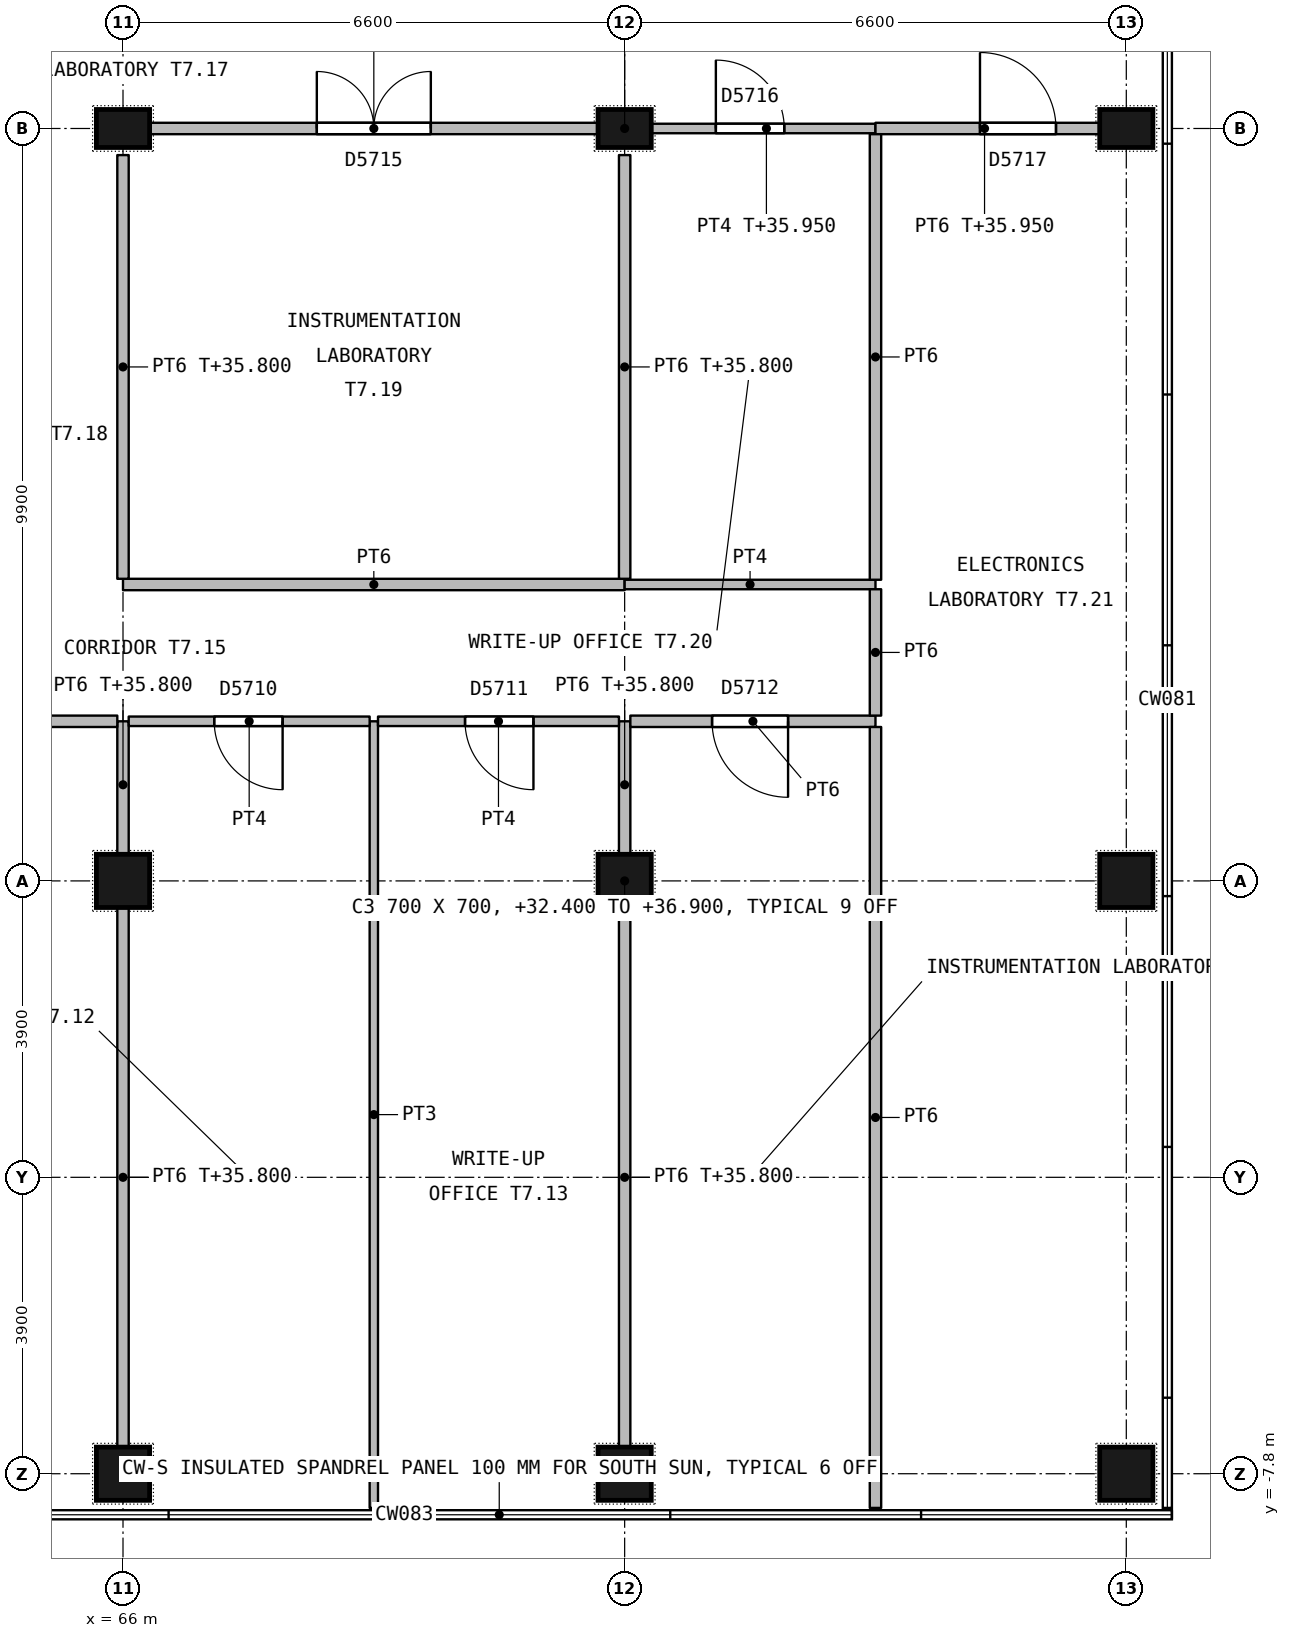
"""IFC4 building model, lengths in metres.
Left out: names, types, materials, properties, quantities, classifications, styles, units other than length and angle.
Written with IfcOpenShell. Run it as: python <this file> out.ifc"""

import sys

from ifc_helpers import new_model, si_unit, direction, frame, frame_2d, origin, origin_2d, place, context, subcontext, project, spatial, rectangle, extrude, element, fill, save


model = new_model("IFC4")
c1 = context("Model", 3, precision=1e-05, world=origin(), true_north=direction((0.0, 1.0)))
c2 = subcontext(c1, "Body", "Model", "MODEL_VIEW")
j1 = project(units=[si_unit("LENGTHUNIT", "METRE"), si_unit("PLANEANGLEUNIT", "RADIAN")], contexts=[c1])
p1 = place(None, origin())
s1 = spatial("IfcSite", under=j1, at=p1, CompositionType="ELEMENT")
p2 = place(p1, origin())
s2 = spatial("IfcBuilding", under=s1, at=p2, CompositionType="ELEMENT")
p3 = place(p2, frame((0.0, 0.0, 32.4)))
s3 = spatial("IfcBuildingStorey", under=s2, at=p3, CompositionType="ELEMENT", Elevation=32.4)
for number, where, z_axis, x_axis in (
    (1, (66.0, -7.8, 0.0), (0.0, 0.0, 1.0), (1.0, 0.0, 0.0)),
    (2, (66.0, 0.0, 0.0), (0.0, 0.0, 1.0), (1.0, 0.0, 0.0)),
):
    element("IfcColumn", number, at=place(p3, frame(where, z_axis=z_axis, x_axis=x_axis)), inside=s3, PredefinedType="COLUMN", context=c2, shape_type="SweptSolid", body=[
        extrude(rectangle(XDim=0.7, YDim=0.7, at=origin_2d()), origin(), (0.0, 0.0, 1.0), 4.5),
    ])
p4 = place(p3, frame((66.0, 9.9, 0.0), z_axis=(0.0, 0.0, 1.0), x_axis=(1.0, 0.0, 0.0)))
e3 = element("IfcColumn", 3, at=p4, inside=s3, PredefinedType="COLUMN", context=c2, shape_type="SweptSolid", body=[
    extrude(rectangle(XDim=0.7, YDim=0.5, at=origin_2d()), origin(), (0.0, 0.0, 1.0), 4.5),
])
for number, where, z_axis, x_axis in (
    (4, (72.6, -7.8, 0.0), (0.0, 0.0, 1.0), (1.0, 0.0, 0.0)),
    (5, (72.6, 0.0, 0.0), (0.0, 0.0, 1.0), (1.0, 0.0, 0.0)),
):
    element("IfcColumn", number, at=place(p3, frame(where, z_axis=z_axis, x_axis=x_axis)), inside=s3, PredefinedType="COLUMN", context=c2, shape_type="SweptSolid", body=[
        extrude(rectangle(XDim=0.7, YDim=0.7, at=origin_2d()), origin(), (0.0, 0.0, 1.0), 4.5),
    ])
p5 = place(p3, frame((72.6, 9.9, 0.0), z_axis=(0.0, 0.0, 1.0), x_axis=(1.0, 0.0, 0.0)))
e6 = element("IfcColumn", 6, at=p5, inside=s3, PredefinedType="COLUMN", context=c2, shape_type="SweptSolid", body=[
    extrude(rectangle(XDim=0.7, YDim=0.5, at=origin_2d()), origin(), (0.0, 0.0, 1.0), 4.5),
])
for number, where, z_axis, x_axis in (
    (7, (79.2, -7.8, 0.0), (0.0, 0.0, 1.0), (1.0, 0.0, 0.0)),
    (8, (79.2, 0.0, 0.0), (0.0, 0.0, 1.0), (1.0, 0.0, 0.0)),
):
    element("IfcColumn", number, at=place(p3, frame(where, z_axis=z_axis, x_axis=x_axis)), inside=s3, PredefinedType="COLUMN", context=c2, shape_type="SweptSolid", body=[
        extrude(rectangle(XDim=0.7, YDim=0.7, at=origin_2d()), origin(), (0.0, 0.0, 1.0), 4.5),
    ])
p6 = place(p3, frame((79.2, 9.9, 0.0), z_axis=(0.0, 0.0, 1.0), x_axis=(1.0, 0.0, 0.0)))
e9 = element("IfcColumn", 9, at=p6, inside=s3, PredefinedType="COLUMN", context=c2, shape_type="SweptSolid", body=[
    extrude(rectangle(XDim=0.7, YDim=0.5, at=origin_2d()), origin(), (0.0, 0.0, 1.0), 4.5),
])
p7 = place(p3, frame((66.35, 9.9, 0.0), z_axis=(0.0, 0.0, 1.0), x_axis=(1.0, 0.0, 0.0)))
e10 = element("IfcWall", 10, at=p7, inside=s3, PredefinedType="PARTITIONING", context=c2, shape_type="SweptSolid", body=[
    extrude(rectangle(XDim=5.9, YDim=0.15, at=frame_2d((2.95, 0.0))), origin(), (0.0, 0.0, 1.0), 3.55),
])
p8 = place(p7, frame((2.2, 0.0, 0.0)))
e11 = element("IfcOpeningElement", 11, at=p8, cuts=e10, PredefinedType="OPENING", context=c2, shape_type="SweptSolid", body=[
    extrude(rectangle(XDim=1.5, YDim=2.1, at=frame_2d((0.75, 1.05))), frame((0.0, 0.085, 0.0), z_axis=(0.0, -1.0, 0.0), x_axis=(1.0, 0.0, 0.0)), (0.0, 0.0, 1.0), 0.17),
])
p9 = place(p3, frame((75.9, 9.9, 0.0), z_axis=(0.0, 0.0, 1.0), x_axis=(-1.0, 0.0, 0.0)))
e12 = element("IfcWall", 12, at=p9, inside=s3, PredefinedType="PARTITIONING", context=c2, shape_type="SweptSolid", body=[
    extrude(rectangle(XDim=2.95, YDim=0.125, at=frame_2d((1.475, 0.0))), origin(), (0.0, 0.0, 1.0), 3.55),
])
p10 = place(p9, frame((1.2, 0.0, 0.0)))
e13 = element("IfcOpeningElement", 13, at=p10, cuts=e12, PredefinedType="OPENING", context=c2, shape_type="SweptSolid", body=[
    extrude(rectangle(XDim=0.9, YDim=2.1, at=frame_2d((0.45, 1.05))), frame((0.0, 0.073, 0.0), z_axis=(0.0, -1.0, 0.0), x_axis=(1.0, 0.0, 0.0)), (0.0, 0.0, 1.0), 0.145),
])
p11 = place(p3, frame((75.9, 9.9, 0.0), z_axis=(0.0, 0.0, 1.0), x_axis=(1.0, 0.0, 0.0)))
e14 = element("IfcWall", 14, at=p11, inside=s3, PredefinedType="PARTITIONING", context=c2, shape_type="SweptSolid", body=[
    extrude(rectangle(XDim=2.95, YDim=0.15, at=frame_2d((1.475, 0.0))), origin(), (0.0, 0.0, 1.0), 3.55),
])
p12 = place(p11, frame((1.375, 0.0, 0.0)))
e15 = element("IfcOpeningElement", 15, at=p12, cuts=e14, PredefinedType="OPENING", context=c2, shape_type="SweptSolid", body=[
    extrude(rectangle(XDim=1.0, YDim=2.1, at=frame_2d((0.5, 1.05))), frame((0.0, 0.085, 0.0), z_axis=(0.0, -1.0, 0.0), x_axis=(1.0, 0.0, 0.0)), (0.0, 0.0, 1.0), 0.17),
])
p13 = place(p3, frame((66.0, -7.45, 0.0), z_axis=(0.0, 0.0, 1.0), x_axis=(0.0, 1.0, 0.0)))
e16 = element("IfcWall", 16, at=p13, inside=s3, PredefinedType="PARTITIONING", context=c2, shape_type="SweptSolid", body=[
    extrude(rectangle(XDim=7.1, YDim=0.15, at=frame_2d((3.55, 0.0))), origin(), (0.0, 0.0, 1.0), 3.4),
])
p14 = place(p3, frame((66.0, 0.35, 0.0), z_axis=(0.0, 0.0, 1.0), x_axis=(0.0, 1.0, 0.0)))
e17 = element("IfcWall", 17, at=p14, inside=s3, PredefinedType="PARTITIONING", context=c2, shape_type="SweptSolid", body=[
    extrude(rectangle(XDim=1.75, YDim=0.15, at=frame_2d((0.875, 0.0))), origin(), (0.0, 0.0, 1.0), 3.4),
])
p15 = place(p3, frame((65.925, 2.1, 0.0), z_axis=(0.0, 0.0, 1.0), x_axis=(-1.0, 0.0, 0.0)))
e18 = element("IfcWall", 18, at=p15, inside=s3, PredefinedType="PARTITIONING", context=c2, shape_type="SweptSolid", body=[
    extrude(rectangle(XDim=6.525, YDim=0.15, at=frame_2d((3.262, 0.0))), origin(), (0.0, 0.0, 1.0), 4.2),
])
p16 = place(p15, frame((2.475, 0.0, 0.0)))
e19 = element("IfcOpeningElement", 19, at=p16, cuts=e18, PredefinedType="OPENING", context=c2, shape_type="SweptSolid", body=[
    extrude(rectangle(XDim=1.5, YDim=2.1, at=frame_2d((0.75, 1.05))), frame((0.0, 0.085, 0.0), z_axis=(0.0, -1.0, 0.0), x_axis=(1.0, 0.0, 0.0)), (0.0, 0.0, 1.0), 0.17),
])
p17 = place(p3, frame((69.3, -8.25, 0.0), z_axis=(0.0, 0.0, 1.0), x_axis=(0.0, 1.0, 0.0)))
e20 = element("IfcWall", 20, at=p17, inside=s3, PredefinedType="PARTITIONING", context=c2, shape_type="SweptSolid", body=[
    extrude(rectangle(XDim=10.35, YDim=0.11, at=frame_2d((5.175, 0.0))), origin(), (0.0, 0.0, 1.0), 4.2),
])
p18 = place(p3, frame((69.245, 2.1, 0.0), z_axis=(0.0, 0.0, 1.0), x_axis=(-1.0, 0.0, 0.0)))
e21 = element("IfcWall", 21, at=p18, inside=s3, PredefinedType="PARTITIONING", context=c2, shape_type="SweptSolid", body=[
    extrude(rectangle(XDim=3.17, YDim=0.125, at=frame_2d((1.585, 0.0))), origin(), (0.0, 0.0, 1.0), 4.2),
])
p19 = place(p18, frame((1.145, 0.0, 0.0)))
e22 = element("IfcOpeningElement", 22, at=p19, cuts=e21, PredefinedType="OPENING", context=c2, shape_type="SweptSolid", body=[
    extrude(rectangle(XDim=0.9, YDim=2.1, at=frame_2d((0.45, 1.05))), frame((0.0, 0.073, 0.0), z_axis=(0.0, -1.0, 0.0), x_axis=(1.0, 0.0, 0.0)), (0.0, 0.0, 1.0), 0.145),
])
p20 = place(p3, frame((72.6, -7.45, 0.0), z_axis=(0.0, 0.0, 1.0), x_axis=(0.0, 1.0, 0.0)))
e23 = element("IfcWall", 23, at=p20, inside=s3, PredefinedType="PARTITIONING", context=c2, shape_type="SweptSolid", body=[
    extrude(rectangle(XDim=7.1, YDim=0.15, at=frame_2d((3.55, 0.0))), origin(), (0.0, 0.0, 1.0), 3.4),
])
p21 = place(p3, frame((72.6, 0.35, 0.0), z_axis=(0.0, 0.0, 1.0), x_axis=(0.0, 1.0, 0.0)))
e24 = element("IfcWall", 24, at=p21, inside=s3, PredefinedType="PARTITIONING", context=c2, shape_type="SweptSolid", body=[
    extrude(rectangle(XDim=1.75, YDim=0.15, at=frame_2d((0.875, 0.0))), origin(), (0.0, 0.0, 1.0), 3.4),
])
p22 = place(p3, frame((72.525, 2.1, 0.0), z_axis=(0.0, 0.0, 1.0), x_axis=(-1.0, 0.0, 0.0)))
e25 = element("IfcWall", 25, at=p22, inside=s3, PredefinedType="PARTITIONING", context=c2, shape_type="SweptSolid", body=[
    extrude(rectangle(XDim=3.17, YDim=0.125, at=frame_2d((1.585, 0.0))), origin(), (0.0, 0.0, 1.0), 4.2),
])
p23 = place(p22, frame((1.125, 0.0, 0.0)))
e26 = element("IfcOpeningElement", 26, at=p23, cuts=e25, PredefinedType="OPENING", context=c2, shape_type="SweptSolid", body=[
    extrude(rectangle(XDim=0.9, YDim=2.1, at=frame_2d((0.45, 1.05))), frame((0.0, 0.073, 0.0), z_axis=(0.0, -1.0, 0.0), x_axis=(1.0, 0.0, 0.0)), (0.0, 0.0, 1.0), 0.145),
])
p24 = place(p3, frame((75.9, 2.1, 0.0), z_axis=(0.0, 0.0, 1.0), x_axis=(-1.0, 0.0, 0.0)))
e27 = element("IfcWall", 27, at=p24, inside=s3, PredefinedType="PARTITIONING", context=c2, shape_type="SweptSolid", body=[
    extrude(rectangle(XDim=3.225, YDim=0.15, at=frame_2d((1.612, 0.0))), origin(), (0.0, 0.0, 1.0), 4.2),
])
p25 = place(p24, frame((1.15, 0.0, 0.0)))
e28 = element("IfcOpeningElement", 28, at=p25, cuts=e27, PredefinedType="OPENING", context=c2, shape_type="SweptSolid", body=[
    extrude(rectangle(XDim=1.0, YDim=2.1, at=frame_2d((0.5, 1.05))), frame((0.0, 0.085, 0.0), z_axis=(0.0, -1.0, 0.0), x_axis=(1.0, 0.0, 0.0)), (0.0, 0.0, 1.0), 0.17),
])
p26 = place(p3, frame((75.9, -8.25, 0.0), z_axis=(0.0, 0.0, 1.0), x_axis=(0.0, 1.0, 0.0)))
e29 = element("IfcWall", 29, at=p26, inside=s3, PredefinedType="PARTITIONING", context=c2, shape_type="SweptSolid", body=[
    extrude(rectangle(XDim=10.275, YDim=0.15, at=frame_2d((5.137, 0.0))), origin(), (0.0, 0.0, 1.0), 4.2),
])
p27 = place(p3, frame((72.6, 3.9, 0.0), z_axis=(0.0, 0.0, 1.0), x_axis=(-1.0, 0.0, 0.0)))
e30 = element("IfcWall", 30, at=p27, inside=s3, PredefinedType="PARTITIONING", context=c2, shape_type="SweptSolid", body=[
    extrude(rectangle(XDim=6.6, YDim=0.15, at=frame_2d((3.3, 0.0))), origin(), (0.0, 0.0, 1.0), 4.2),
])
p28 = place(p3, frame((75.9, 3.9, 0.0), z_axis=(0.0, 0.0, 1.0), x_axis=(-1.0, 0.0, 0.0)))
e31 = element("IfcWall", 31, at=p28, inside=s3, PredefinedType="PARTITIONING", context=c2, shape_type="SweptSolid", body=[
    extrude(rectangle(XDim=3.3, YDim=0.125, at=frame_2d((1.65, 0.0))), origin(), (0.0, 0.0, 1.0), 4.2),
])
p29 = place(p3, frame((75.9, 2.175, 0.0), z_axis=(0.0, 0.0, 1.0), x_axis=(0.0, 1.0, 0.0)))
e32 = element("IfcWall", 32, at=p29, inside=s3, PredefinedType="PARTITIONING", context=c2, shape_type="SweptSolid", body=[
    extrude(rectangle(XDim=1.662, YDim=0.15, at=frame_2d((0.831, 0.0))), origin(), (0.0, 0.0, 1.0), 4.2),
])
for number, where, z_axis, x_axis in (
    (33, (66.0, 3.975, 0.0), (0.0, 0.0, 1.0), (0.0, 1.0, 0.0)),
    (34, (72.6, 3.975, 0.0), (0.0, 0.0, 1.0), (0.0, 1.0, 0.0)),
):
    element("IfcWall", number, at=place(p3, frame(where, z_axis=z_axis, x_axis=x_axis)), inside=s3, PredefinedType="PARTITIONING", context=c2, shape_type="SweptSolid", body=[
        extrude(rectangle(XDim=5.575, YDim=0.15, at=frame_2d((2.788, 0.0))), origin(), (0.0, 0.0, 1.0), 3.4),
    ])
p30 = place(p3, frame((75.9, 3.962, 0.0), z_axis=(0.0, 0.0, 1.0), x_axis=(0.0, 1.0, 0.0)))
e35 = element("IfcWall", 35, at=p30, inside=s3, PredefinedType="PARTITIONING", context=c2, shape_type="SweptSolid", body=[
    extrude(rectangle(XDim=5.863, YDim=0.15, at=frame_2d((2.931, 0.0))), origin(), (0.0, 0.0, 1.0), 4.2),
])
p31 = place(p19, origin())
e36 = element("IfcDoor", 36, at=p31, inside=s3, OperationType="SINGLE_SWING_LEFT", PredefinedType="DOOR", context=c2, shape_type="SweptSolid", body=[
    extrude(rectangle(XDim=0.9, YDim=2.1, at=frame_2d((0.45, 1.05))), frame((0.0, 0.027, 0.0), z_axis=(0.0, -1.0, 0.0), x_axis=(1.0, 0.0, 0.0)), (0.0, 0.0, 1.0), 0.054),
])
fill(e22, e36)
p32 = place(p23, origin())
e37 = element("IfcDoor", 37, at=p32, inside=s3, OperationType="SINGLE_SWING_LEFT", PredefinedType="DOOR", context=c2, shape_type="SweptSolid", body=[
    extrude(rectangle(XDim=0.9, YDim=2.1, at=frame_2d((0.45, 1.05))), frame((0.0, 0.027, 0.0), z_axis=(0.0, -1.0, 0.0), x_axis=(1.0, 0.0, 0.0)), (0.0, 0.0, 1.0), 0.054),
])
fill(e26, e37)
p33 = place(p25, origin())
e38 = element("IfcDoor", 38, at=p33, inside=s3, OperationType="SINGLE_SWING_LEFT", PredefinedType="DOOR", context=c2, shape_type="SweptSolid", body=[
    extrude(rectangle(XDim=1.0, YDim=2.1, at=frame_2d((0.5, 1.05))), frame((0.0, 0.027, 0.0), z_axis=(0.0, -1.0, 0.0), x_axis=(1.0, 0.0, 0.0)), (0.0, 0.0, 1.0), 0.054),
])
fill(e28, e38)
p34 = place(p8, origin())
e39 = element("IfcDoor", 39, at=p34, inside=s3, OperationType="DOUBLE_DOOR_SINGLE_SWING", PredefinedType="DOOR", context=c2, shape_type="SweptSolid", body=[
    extrude(rectangle(XDim=1.5, YDim=2.1, at=frame_2d((0.75, 1.05))), frame((0.0, 0.027, 0.0), z_axis=(0.0, -1.0, 0.0), x_axis=(1.0, 0.0, 0.0)), (0.0, 0.0, 1.0), 0.054),
])
fill(e11, e39)
p35 = place(p10, origin())
e40 = element("IfcDoor", 40, at=p35, inside=s3, OperationType="SINGLE_SWING_RIGHT", PredefinedType="DOOR", context=c2, shape_type="SweptSolid", body=[
    extrude(rectangle(XDim=0.9, YDim=2.1, at=frame_2d((0.45, 1.05))), frame((0.0, 0.027, 0.0), z_axis=(0.0, -1.0, 0.0), x_axis=(1.0, 0.0, 0.0)), (0.0, 0.0, 1.0), 0.054),
])
fill(e13, e40)
p36 = place(p12, origin())
e41 = element("IfcDoor", 41, at=p36, inside=s3, OperationType="SINGLE_SWING_LEFT", PredefinedType="DOOR", context=c2, shape_type="SweptSolid", body=[
    extrude(rectangle(XDim=1.0, YDim=2.1, at=frame_2d((0.5, 1.05))), frame((0.0, 0.027, 0.0), z_axis=(0.0, -1.0, 0.0), x_axis=(1.0, 0.0, 0.0)), (0.0, 0.0, 1.0), 0.054),
])
fill(e15, e41)
save(model, sys.argv[1])
